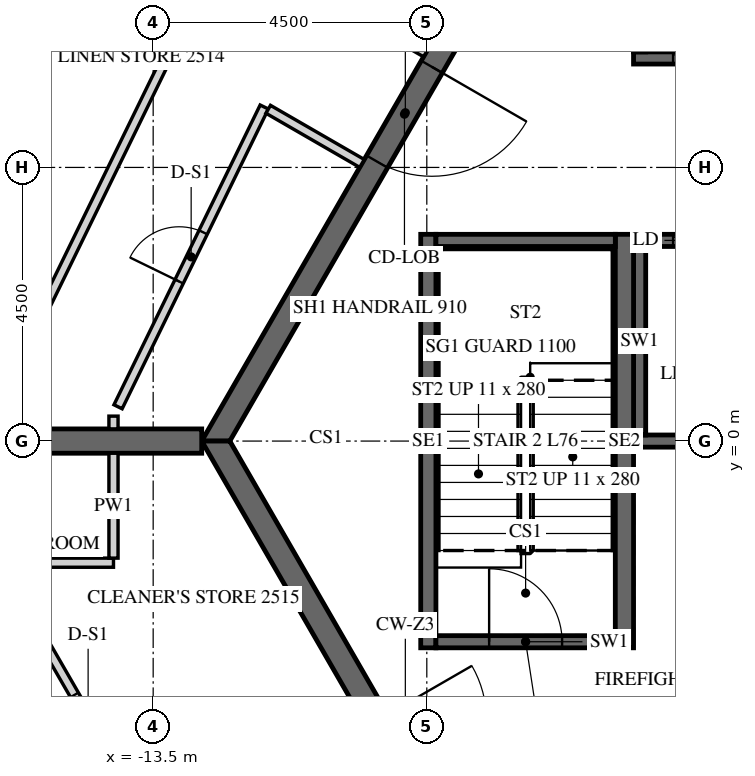
"""IFC4 building model, lengths in metres.
Left out: names, types, materials, properties, quantities, classifications, styles, units other than length and angle.
Written with IfcOpenShell. Run it as: python <this file> out.ifc"""

import sys

from ifc_helpers import new_model, si_unit, direction, frame, frame_2d, origin, place, context, subcontext, project, spatial, polyline, rectangle, outline, extrude, element, fill, save


model = new_model("IFC4")
c1 = context("Model", 3, precision=1e-05, world=origin(), true_north=direction((0.0, 1.0)))
c2 = subcontext(c1, "Body", "Model", "MODEL_VIEW")
j1 = project(units=[si_unit("LENGTHUNIT", "METRE"), si_unit("PLANEANGLEUNIT", "RADIAN")], contexts=[c1])
p1 = place(None, origin())
s1 = spatial("IfcSite", under=j1, at=p1, CompositionType="ELEMENT")
p2 = place(p1, origin())
s2 = spatial("IfcBuilding", under=s1, at=p2, CompositionType="ELEMENT")
p3 = place(p2, frame((0.0, 0.0, 314.7)))
s3 = spatial("IfcBuildingStorey", under=s2, at=p3, CompositionType="ELEMENT", Elevation=314.7)
p4 = place(p3, frame((-6.235, 10.8, -0.15), z_axis=(0.0, 0.0, 1.0), x_axis=(-0.499996419489, -0.866027470984, 0.0)))
e1 = element("IfcWall", 1, at=p4, inside=s3, PredefinedType="SHEAR", context=c2, shape_type="SweptSolid", body=[
    extrude(outline(polyline([(-0.115, -0.2), (12.586, -0.2), (12.355, 0.2), (0.115, 0.2), (-0.115, -0.2)])), origin(), (0.0, 0.0, 1.0), 3.9),
])
p5 = place(p4, frame((5.364, 0.0, 0.15)))
e2 = element("IfcOpeningElement", 2, at=p5, cuts=e1, PredefinedType="OPENING", context=c2, shape_type="SweptSolid", body=[
    extrude(rectangle(XDim=1.8, YDim=2.4, at=frame_2d((0.9, 1.2))), frame((0.0, 0.21, 0.0), z_axis=(0.0, -1.0, 0.0), x_axis=(1.0, 0.0, 0.0)), (0.0, 0.0, 1.0), 0.42),
])
p6 = place(p3, frame((-12.471, 0.0, -0.15), z_axis=(0.0, 0.0, 1.0), x_axis=(0.499996419489, -0.866027470984, 0.0)))
e3 = element("IfcWall", 3, at=p6, inside=s3, PredefinedType="SHEAR", context=c2, shape_type="SweptSolid", body=[
    extrude(outline(polyline([(-0.115, -0.2), (12.586, -0.2), (12.355, 0.2), (0.115, 0.2), (-0.115, -0.2)])), origin(), (0.0, 0.0, 1.0), 3.9),
])
p7 = place(p6, frame((5.306, 0.0, 0.15)))
e4 = element("IfcOpeningElement", 4, at=p7, cuts=e3, PredefinedType="OPENING", context=c2, shape_type="SweptSolid", body=[
    extrude(rectangle(XDim=1.8, YDim=2.4, at=frame_2d((0.9, 1.2))), frame((0.0, 0.21, 0.0), z_axis=(0.0, -1.0, 0.0), x_axis=(1.0, 0.0, 0.0)), (0.0, 0.0, 1.0), 0.42),
])
p8 = place(p3, frame((-12.702, 0.0, -0.15), z_axis=(0.0, 0.0, 1.0), x_axis=(-1.0, 0.0, 0.0)))
e5 = element("IfcWall", 5, at=p8, inside=s3, PredefinedType="SHEAR", context=c2, shape_type="SweptSolid", body=[
    extrude(rectangle(XDim=15.544, YDim=0.4, at=frame_2d((7.772, 0.0))), origin(), (0.0, 0.0, 1.0), 3.9),
])
p9 = place(p8, frame((6.872, 0.0, 0.15)))
e6 = element("IfcOpeningElement", 6, at=p9, cuts=e5, PredefinedType="OPENING", context=c2, shape_type="SweptSolid", body=[
    extrude(rectangle(XDim=1.8, YDim=2.4, at=frame_2d((0.9, 1.2))), frame((0.0, 0.21, 0.0), z_axis=(0.0, -1.0, 0.0), x_axis=(1.0, 0.0, 0.0)), (0.0, 0.0, 1.0), 0.42),
])
p10 = place(p3, frame((-5.6, 6.3, -0.25), z_axis=(0.0, 0.0, 1.0), x_axis=(1.0, 0.0, 0.0)))
e7 = element("IfcWall", 7, at=p10, inside=s3, PredefinedType="SHEAR", context=c2, shape_type="SweptSolid", body=[
    extrude(rectangle(XDim=11.2, YDim=0.2, at=frame_2d((5.6, 0.0))), origin(), (0.0, 0.0, 1.0), 3.9),
])
p11 = place(p10, frame((8.45, 0.0, 0.25)))
e8 = element("IfcOpeningElement", 8, at=p11, cuts=e7, PredefinedType="OPENING", context=c2, shape_type="SweptSolid", body=[
    extrude(rectangle(XDim=0.9, YDim=2.1, at=frame_2d((0.45, 1.05))), frame((0.0, 0.11, 0.0), z_axis=(0.0, -1.0, 0.0), x_axis=(1.0, 0.0, 0.0)), (0.0, 0.0, 1.0), 0.22),
])
p12 = place(p10, frame((0.65, 0.0, 0.25)))
e9 = element("IfcOpeningElement", 9, at=p12, cuts=e7, PredefinedType="OPENING", context=c2, shape_type="SweptSolid", body=[
    extrude(rectangle(XDim=1.1, YDim=2.1, at=frame_2d((0.55, 1.05))), frame((0.0, 0.11, 0.0), z_axis=(0.0, -1.0, 0.0), x_axis=(1.0, 0.0, 0.0)), (0.0, 0.0, 1.0), 0.22),
])
p13 = place(p10, frame((2.85, 0.0, 0.25)))
e10 = element("IfcOpeningElement", 10, at=p13, cuts=e7, PredefinedType="OPENING", context=c2, shape_type="SweptSolid", body=[
    extrude(rectangle(XDim=1.1, YDim=2.1, at=frame_2d((0.55, 1.05))), frame((0.0, 0.11, 0.0), z_axis=(0.0, -1.0, 0.0), x_axis=(1.0, 0.0, 0.0)), (0.0, 0.0, 1.0), 0.22),
])
p14 = place(p10, frame((5.05, 0.0, 0.25)))
e11 = element("IfcOpeningElement", 11, at=p14, cuts=e7, PredefinedType="OPENING", context=c2, shape_type="SweptSolid", body=[
    extrude(rectangle(XDim=1.1, YDim=2.1, at=frame_2d((0.55, 1.05))), frame((0.0, 0.11, 0.0), z_axis=(0.0, -1.0, 0.0), x_axis=(1.0, 0.0, 0.0)), (0.0, 0.0, 1.0), 0.22),
])
p15 = place(p3, frame((-5.6, 3.3, -0.25), z_axis=(0.0, 0.0, 1.0), x_axis=(1.0, 0.0, 0.0)))
e12 = element("IfcWall", 12, at=p15, inside=s3, PredefinedType="SHEAR", context=c2, shape_type="SweptSolid", body=[
    extrude(rectangle(XDim=6.6, YDim=0.2, at=frame_2d((3.3, 0.0))), origin(), (0.0, 0.0, 1.0), 3.9),
])
p16 = place(p15, frame((0.65, 0.0, 0.25)))
e13 = element("IfcOpeningElement", 13, at=p16, cuts=e12, PredefinedType="OPENING", context=c2, shape_type="SweptSolid", body=[
    extrude(rectangle(XDim=1.1, YDim=2.1, at=frame_2d((0.55, 1.05))), frame((0.0, 0.11, 0.0), z_axis=(0.0, -1.0, 0.0), x_axis=(1.0, 0.0, 0.0)), (0.0, 0.0, 1.0), 0.22),
])
p17 = place(p15, frame((2.85, 0.0, 0.25)))
e14 = element("IfcOpeningElement", 14, at=p17, cuts=e12, PredefinedType="OPENING", context=c2, shape_type="SweptSolid", body=[
    extrude(rectangle(XDim=1.1, YDim=2.1, at=frame_2d((0.55, 1.05))), frame((0.0, 0.11, 0.0), z_axis=(0.0, -1.0, 0.0), x_axis=(1.0, 0.0, 0.0)), (0.0, 0.0, 1.0), 0.22),
])
p18 = place(p15, frame((5.05, 0.0, 0.25)))
e15 = element("IfcOpeningElement", 15, at=p18, cuts=e12, PredefinedType="OPENING", context=c2, shape_type="SweptSolid", body=[
    extrude(rectangle(XDim=1.1, YDim=2.1, at=frame_2d((0.55, 1.05))), frame((0.0, 0.11, 0.0), z_axis=(0.0, -1.0, 0.0), x_axis=(1.0, 0.0, 0.0)), (0.0, 0.0, 1.0), 0.22),
])
p19 = place(p3, frame((-5.6, 0.0, -0.25), z_axis=(0.0, 0.0, 1.0), x_axis=(1.0, 0.0, 0.0)))
e16 = element("IfcWall", 16, at=p19, inside=s3, PredefinedType="SHEAR", context=c2, shape_type="SweptSolid", body=[
    extrude(rectangle(XDim=11.2, YDim=0.2, at=frame_2d((5.6, 0.0))), origin(), (0.0, 0.0, 1.0), 3.9),
])
p20 = place(p3, frame((-5.5, 0.1, -0.25), z_axis=(0.0, 0.0, 1.0), x_axis=(0.0, 1.0, 0.0)))
e17 = element("IfcWall", 17, at=p20, inside=s3, PredefinedType="SHEAR", context=c2, shape_type="SweptSolid", body=[
    extrude(rectangle(XDim=3.1, YDim=0.2, at=frame_2d((1.55, 0.0))), origin(), (0.0, 0.0, 1.0), 3.9),
])
p21 = place(p3, frame((-5.75, -3.4, -0.25), z_axis=(0.0, 0.0, 1.0), x_axis=(0.0, 1.0, 0.0)))
e18 = element("IfcWall", 18, at=p21, inside=s3, PredefinedType="SHEAR", context=c2, shape_type="SweptSolid", body=[
    extrude(rectangle(XDim=6.8, YDim=0.3, at=frame_2d((3.4, 0.0))), origin(), (0.0, 0.0, 1.0), 3.9),
])
p22 = place(p3, frame((-8.975, -3.4, -0.25), z_axis=(0.0, 0.0, 1.0), x_axis=(0.0, 1.0, 0.0)))
e19 = element("IfcWall", 19, at=p22, inside=s3, PredefinedType="SHEAR", context=c2, shape_type="SweptSolid", body=[
    extrude(rectangle(XDim=6.8, YDim=0.25, at=frame_2d((3.4, 0.0))), origin(), (0.0, 0.0, 1.0), 3.9),
])
p23 = place(p3, frame((-8.85, 3.3, -0.25), z_axis=(0.0, 0.0, 1.0), x_axis=(1.0, 0.0, 0.0)))
e20 = element("IfcWall", 20, at=p23, inside=s3, PredefinedType="SHEAR", context=c2, shape_type="SweptSolid", body=[
    extrude(rectangle(XDim=2.95, YDim=0.2, at=frame_2d((1.475, 0.0))), origin(), (0.0, 0.0, 1.0), 3.9),
])
p24 = place(p3, frame((-8.85, -3.3, -0.25), z_axis=(0.0, 0.0, 1.0), x_axis=(1.0, 0.0, 0.0)))
e21 = element("IfcWall", 21, at=p24, inside=s3, PredefinedType="SHEAR", context=c2, shape_type="SweptSolid", body=[
    extrude(rectangle(XDim=2.95, YDim=0.2, at=frame_2d((1.475, 0.0))), origin(), (0.0, 0.0, 1.0), 3.9),
])
p25 = place(p24, frame((0.875, 0.0, 0.25)))
e22 = element("IfcOpeningElement", 22, at=p25, cuts=e21, PredefinedType="OPENING", context=c2, shape_type="SweptSolid", body=[
    extrude(rectangle(XDim=1.2, YDim=2.4, at=frame_2d((0.6, 1.2))), frame((0.0, 0.11, 0.0), z_axis=(0.0, -1.0, 0.0), x_axis=(1.0, 0.0, 0.0)), (0.0, 0.0, 1.0), 0.22),
])
p26 = place(p3, frame((-8.247, 16.625, 0.0), z_axis=(0.0, 0.0, 1.0), x_axis=(-0.438381655451, -0.898788920806, 0.0)))
e23 = element("IfcWall", 23, at=p26, inside=s3, PredefinedType="PARTITIONING", context=c2, shape_type="SweptSolid", body=[
    extrude(rectangle(XDim=16.272, YDim=0.15, at=frame_2d((8.136, 0.0))), origin(), (0.0, 0.0, 1.0), 2.988),
])
p27 = place(p26, frame((5.703, 0.0, 0.0)))
e24 = element("IfcOpeningElement", 24, at=p27, cuts=e23, PredefinedType="OPENING", context=c2, shape_type="SweptSolid", body=[
    extrude(rectangle(XDim=1.0, YDim=2.1, at=frame_2d((0.5, 1.05))), frame((0.0, 0.085, 0.0), z_axis=(0.0, -1.0, 0.0), x_axis=(1.0, 0.0, 0.0)), (0.0, 0.0, 1.0), 0.17),
])
p28 = place(p3, frame((-9.016, 6.384, 0.0), z_axis=(0.0, 0.0, 1.0), x_axis=(-0.866029291668, 0.499993265928, 0.0)))
e25 = element("IfcWall", 25, at=p28, inside=s3, PredefinedType="PARTITIONING", context=c2, shape_type="SweptSolid", body=[
    extrude(rectangle(XDim=2.003, YDim=0.15, at=frame_2d((1.001, 0.0))), origin(), (0.0, 0.0, 1.0), 2.988),
])
p29 = place(p3, frame((-14.153, 0.2, 0.0), z_axis=(0.0, 0.0, 1.0), x_axis=(0.0, 1.0, 0.0)))
e26 = element("IfcWall", 26, at=p29, inside=s3, PredefinedType="PARTITIONING", context=c2, shape_type="SweptSolid", body=[
    extrude(rectangle(XDim=0.21, YDim=0.15, at=frame_2d((0.105, 0.0))), origin(), (0.0, 0.0, 1.0), 2.988),
])
p30 = place(p3, frame((-14.078, 0.564, 0.0), z_axis=(0.0, 0.0, 1.0), x_axis=(0.438378907599, 0.898790261058, 0.0)))
e27 = element("IfcWall", 27, at=p30, inside=s3, PredefinedType="PARTITIONING", context=c2, shape_type="SweptSolid", body=[
    extrude(rectangle(XDim=5.485, YDim=0.15, at=frame_2d((2.743, 0.0))), origin(), (0.0, 0.0, 1.0), 2.988),
])
p31 = place(p30, frame((2.292, 0.0, 0.0)))
e28 = element("IfcOpeningElement", 28, at=p31, cuts=e27, PredefinedType="OPENING", context=c2, shape_type="SweptSolid", body=[
    extrude(rectangle(XDim=0.9, YDim=2.1, at=frame_2d((0.45, 1.05))), frame((0.0, 0.085, 0.0), z_axis=(0.0, -1.0, 0.0), x_axis=(1.0, 0.0, 0.0)), (0.0, 0.0, 1.0), 0.17),
])
p32 = place(p3, frame((-11.608, 5.456, 0.0), z_axis=(0.0, 0.0, 1.0), x_axis=(0.866032625367, -0.499987491644, 0.0)))
e29 = element("IfcWall", 29, at=p32, inside=s3, PredefinedType="PARTITIONING", context=c2, shape_type="SweptSolid", body=[
    extrude(rectangle(XDim=1.781, YDim=0.15, at=frame_2d((0.89, 0.0))), origin(), (0.0, 0.0, 1.0), 2.988),
])
p33 = place(p3, frame((-17.659, -2.814, 0.0), z_axis=(0.0, 0.0, 1.0), x_axis=(0.499992611149, -0.866029669697, 0.0)))
e30 = element("IfcWall", 30, at=p33, inside=s3, PredefinedType="PARTITIONING", context=c2, shape_type="SweptSolid", body=[
    extrude(rectangle(XDim=14.602, YDim=0.15, at=frame_2d((7.301, 0.0))), origin(), (0.0, 0.0, 1.0), 2.988),
])
p34 = place(p33, frame((2.925, 0.0, 0.0)))
e31 = element("IfcOpeningElement", 31, at=p34, cuts=e30, PredefinedType="OPENING", context=c2, shape_type="SweptSolid", body=[
    extrude(rectangle(XDim=1.0, YDim=2.1, at=frame_2d((0.5, 1.05))), frame((0.0, 0.085, 0.0), z_axis=(0.0, -1.0, 0.0), x_axis=(1.0, 0.0, 0.0)), (0.0, 0.0, 1.0), 0.17),
])
p35 = place(p33, frame((13.452, 0.0, 0.0)))
e32 = element("IfcOpeningElement", 32, at=p35, cuts=e30, PredefinedType="OPENING", context=c2, shape_type="SweptSolid", body=[
    extrude(rectangle(XDim=1.0, YDim=2.1, at=frame_2d((0.5, 1.05))), frame((0.0, 0.085, 0.0), z_axis=(0.0, -1.0, 0.0), x_axis=(1.0, 0.0, 0.0)), (0.0, 0.0, 1.0), 0.17),
])
p36 = place(p3, frame((-13.481, -6.451, 0.0), z_axis=(0.0, 0.0, 1.0), x_axis=(-0.499990905326, 0.866030654533, 0.0)))
e33 = element("IfcWall", 33, at=p36, inside=s3, PredefinedType="PARTITIONING", context=c2, shape_type="SweptSolid", body=[
    extrude(rectangle(XDim=4.356, YDim=0.15, at=frame_2d((2.178, 0.0))), origin(), (0.0, 0.0, 1.0), 2.988),
])
p37 = place(p36, frame((1.728, 0.0, 0.0)))
e34 = element("IfcOpeningElement", 34, at=p37, cuts=e33, PredefinedType="OPENING", context=c2, shape_type="SweptSolid", body=[
    extrude(rectangle(XDim=0.9, YDim=2.1, at=frame_2d((0.45, 1.05))), frame((0.0, 0.085, 0.0), z_axis=(0.0, -1.0, 0.0), x_axis=(1.0, 0.0, 0.0)), (0.0, 0.0, 1.0), 0.17),
])
p38 = place(p3, frame((-15.245, -2.0, 0.0), z_axis=(0.0, 0.0, 1.0), x_axis=(1.0, 0.0, 0.0)))
e35 = element("IfcWall", 35, at=p38, inside=s3, PredefinedType="PARTITIONING", context=c2, shape_type="SweptSolid", body=[
    extrude(rectangle(XDim=1.092, YDim=0.15, at=frame_2d((0.546, 0.0))), origin(), (0.0, 0.0, 1.0), 2.988),
])
p39 = place(p3, frame((-14.153, -1.925, 0.0), z_axis=(0.0, 0.0, 1.0), x_axis=(0.0, 1.0, 0.0)))
e36 = element("IfcWall", 36, at=p39, inside=s3, PredefinedType="PARTITIONING", context=c2, shape_type="SweptSolid", body=[
    extrude(rectangle(XDim=1.725, YDim=0.15, at=frame_2d((0.863, 0.0))), origin(), (0.0, 0.0, 1.0), 2.988),
])
p40 = place(p5, origin())
e37 = element("IfcDoor", 37, at=p40, inside=s3, OperationType="DOUBLE_DOOR_SINGLE_SWING", PredefinedType="DOOR", context=c2, shape_type="SweptSolid", body=[
    extrude(rectangle(XDim=1.8, YDim=2.4, at=frame_2d((0.9, 1.2))), frame((0.0, 0.025, 0.0), z_axis=(0.0, -1.0, 0.0), x_axis=(1.0, 0.0, 0.0)), (0.0, 0.0, 1.0), 0.05),
])
fill(e2, e37)
p41 = place(p25, origin())
e38 = element("IfcDoor", 38, at=p41, inside=s3, OperationType="SINGLE_SWING_LEFT", PredefinedType="DOOR", context=c2, shape_type="SweptSolid", body=[
    extrude(rectangle(XDim=1.2, YDim=2.4, at=frame_2d((0.6, 1.2))), frame((0.0, 0.025, 0.0), z_axis=(0.0, -1.0, 0.0), x_axis=(1.0, 0.0, 0.0)), (0.0, 0.0, 1.0), 0.05),
])
fill(e22, e38)
p42 = place(p12, origin())
e39 = element("IfcDoor", 39, at=p42, inside=s3, OperationType="SLIDING_TO_LEFT", PredefinedType="DOOR", context=c2, shape_type="SweptSolid", body=[
    extrude(rectangle(XDim=1.1, YDim=2.1, at=frame_2d((0.55, 1.05))), frame((0.0, 0.025, 0.0), z_axis=(0.0, -1.0, 0.0), x_axis=(1.0, 0.0, 0.0)), (0.0, 0.0, 1.0), 0.05),
])
fill(e9, e39)
p43 = place(p16, origin())
e40 = element("IfcDoor", 40, at=p43, inside=s3, OperationType="SLIDING_TO_LEFT", PredefinedType="DOOR", context=c2, shape_type="SweptSolid", body=[
    extrude(rectangle(XDim=1.1, YDim=2.1, at=frame_2d((0.55, 1.05))), frame((0.0, 0.025, 0.0), z_axis=(0.0, -1.0, 0.0), x_axis=(1.0, 0.0, 0.0)), (0.0, 0.0, 1.0), 0.05),
])
fill(e13, e40)
p44 = place(p31, origin())
e41 = element("IfcDoor", 41, at=p44, inside=s3, OperationType="SINGLE_SWING_LEFT", PredefinedType="DOOR", context=c2, shape_type="SweptSolid", body=[
    extrude(rectangle(XDim=0.9, YDim=2.1, at=frame_2d((0.45, 1.05))), frame((0.0, 0.025, 0.0), z_axis=(0.0, -1.0, 0.0), x_axis=(1.0, 0.0, 0.0)), (0.0, 0.0, 1.0), 0.05),
])
fill(e28, e41)
p45 = place(p37, origin())
e42 = element("IfcDoor", 42, at=p45, inside=s3, OperationType="SINGLE_SWING_RIGHT", PredefinedType="DOOR", context=c2, shape_type="SweptSolid", body=[
    extrude(rectangle(XDim=0.9, YDim=2.1, at=frame_2d((0.45, 1.05))), frame((0.0, 0.025, 0.0), z_axis=(0.0, -1.0, 0.0), x_axis=(1.0, 0.0, 0.0)), (0.0, 0.0, 1.0), 0.05),
])
fill(e34, e42)
save(model, sys.argv[1])
